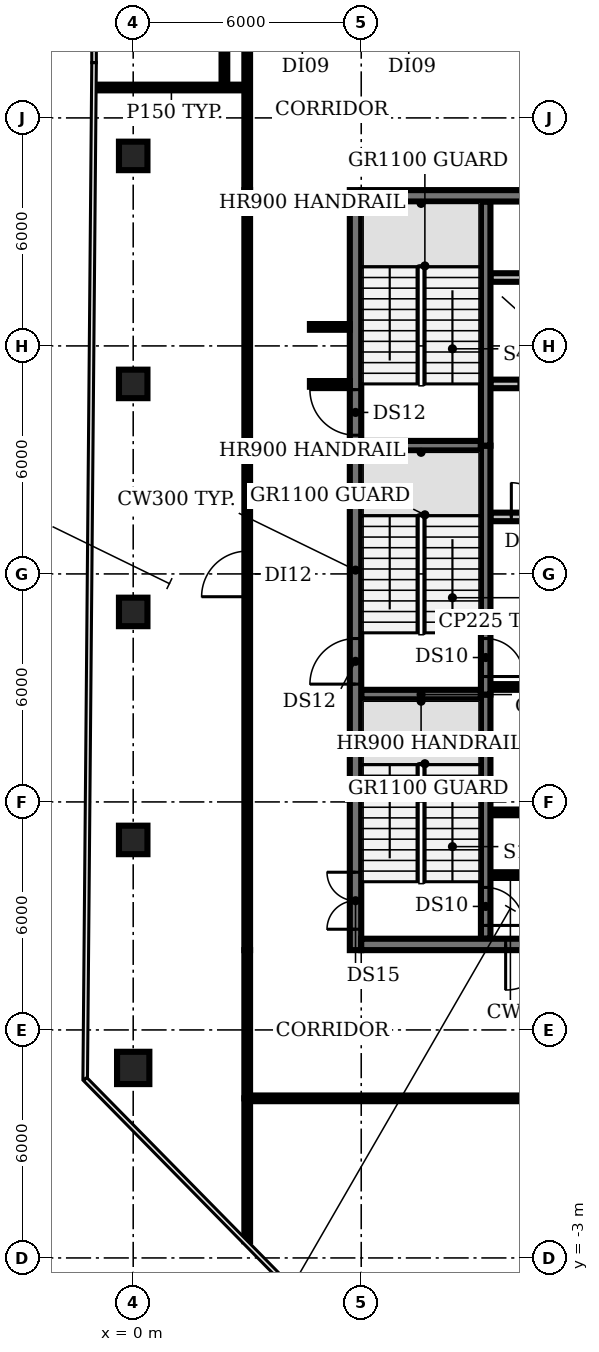
"""IFC4 building model, lengths in metres.
Left out: names, types, materials, properties, quantities, classifications, styles, units other than length and angle.
Written with IfcOpenShell. Run it as: python <this file> out.ifc"""

import sys

from ifc_helpers import new_model, si_unit, direction, frame, frame_2d, origin, origin_2d, place, context, subcontext, project, spatial, rectangle, circle, extrude, element, fill, save


model = new_model("IFC4")
c1 = context("Model", 3, precision=1e-05, world=origin(), true_north=direction((0.0, 1.0)))
c2 = subcontext(c1, "Body", "Model", "MODEL_VIEW")
j1 = project(units=[si_unit("LENGTHUNIT", "METRE"), si_unit("PLANEANGLEUNIT", "RADIAN")], contexts=[c1])
p1 = place(None, origin())
s1 = spatial("IfcSite", under=j1, at=p1, CompositionType="ELEMENT")
p2 = place(p1, origin())
s2 = spatial("IfcBuilding", under=s1, at=p2, CompositionType="ELEMENT")
p3 = place(p2, frame((0.0, 0.0, 285.2)))
s3 = spatial("IfcBuildingStorey", under=s2, at=p3, CompositionType="ELEMENT", Elevation=285.2)
p4 = place(p3, frame((0.0, 2.0, 0.0), z_axis=(0.0, 0.0, 1.0), x_axis=(1.0, 0.0, 0.0)))
e1 = element("IfcColumn", 1, at=p4, inside=s3, PredefinedType="COLUMN", context=c2, shape_type="SweptSolid", body=[
    extrude(circle(Radius=0.425, at=origin_2d()), origin(), (0.0, 0.0, 1.0), 3.85),
])
for number, where, z_axis, x_axis in (
    (2, (0.0, 8.0, 0.0), (0.0, 0.0, 1.0), (1.0, 0.0, 0.0)),
    (3, (0.0, 14.0, 0.0), (0.0, 0.0, 1.0), (1.0, 0.0, 0.0)),
    (4, (0.0, 20.0, 0.0), (0.0, 0.0, 1.0), (1.0, 0.0, 0.0)),
    (5, (0.0, 26.0, 0.0), (0.0, 0.0, 1.0), (1.0, 0.0, 0.0)),
):
    element("IfcColumn", number, at=place(p3, frame(where, z_axis=z_axis, x_axis=x_axis)), inside=s3, PredefinedType="COLUMN", context=c2, shape_type="SweptSolid", body=[
        extrude(rectangle(XDim=0.75, YDim=0.75, at=origin_2d()), origin(), (0.0, 0.0, 1.0), 3.85),
    ])
for number, where, z_axis, x_axis in (
    (6, (9.4, 7.075, 0.0), (0.0, 0.0, 1.0), (1.0, 0.0, 0.0)),
    (7, (9.4, 8.725, 0.0), (0.0, 0.0, 1.0), (1.0, 0.0, 0.0)),
    (8, (9.4, 10.375, 0.0), (0.0, 0.0, 1.0), (1.0, 0.0, 0.0)),
):
    element("IfcWall", number, at=place(p3, frame(where, z_axis=z_axis, x_axis=x_axis)), inside=s3, PredefinedType="SHEAR", context=c2, shape_type="SweptSolid", body=[
        extrude(rectangle(XDim=1.05, YDim=0.15, at=frame_2d((0.525, 0.0))), origin(), (0.0, 0.0, 1.0), 3.85),
    ])
p5 = place(p3, frame((6.0, 11.825, 0.0), z_axis=(0.0, 0.0, 1.0), x_axis=(1.0, 0.0, 0.0)))
e9 = element("IfcWall", 9, at=p5, inside=s3, PredefinedType="SHEAR", context=c2, shape_type="SweptSolid", body=[
    extrude(rectangle(XDim=3.15, YDim=0.25, at=frame_2d((1.575, 0.0))), origin(), (0.0, 0.0, 1.0), 3.85),
])
p6 = place(p3, frame((9.4, 12.025, 0.0), z_axis=(0.0, 0.0, 1.0), x_axis=(1.0, 0.0, 0.0)))
e10 = element("IfcWall", 10, at=p6, inside=s3, PredefinedType="SHEAR", context=c2, shape_type="SweptSolid", body=[
    extrude(rectangle(XDim=1.05, YDim=0.15, at=frame_2d((0.525, 0.0))), origin(), (0.0, 0.0, 1.0), 3.85),
])
p7 = place(p3, frame((9.4, 13.7, 0.0), z_axis=(0.0, 0.0, 1.0), x_axis=(1.0, 0.0, 0.0)))
e11 = element("IfcWall", 11, at=p7, inside=s3, PredefinedType="PARTITIONING", context=c2, shape_type="SweptSolid", body=[
    extrude(rectangle(XDim=4.0, YDim=0.225, at=frame_2d((2.0, 0.0))), origin(), (0.0, 0.0, 1.0), 3.85),
])
p8 = place(p3, frame((9.4, 16.5, 0.0), z_axis=(0.0, 0.0, 1.0), x_axis=(1.0, 0.0, 0.0)))
e12 = element("IfcWall", 12, at=p8, inside=s3, PredefinedType="PARTITIONING", context=c2, shape_type="SweptSolid", body=[
    extrude(rectangle(XDim=14.6, YDim=0.225, at=frame_2d((7.3, 0.0))), origin(), (0.0, 0.0, 1.0), 3.85),
])
p9 = place(p8, frame((0.55, 0.0, 0.0)))
e13 = element("IfcOpeningElement", 13, at=p9, cuts=e12, PredefinedType="OPENING", context=c2, shape_type="SweptSolid", body=[
    extrude(rectangle(XDim=0.9, YDim=2.1, at=frame_2d((0.45, 1.05))), frame((0.0, 0.123, 0.0), z_axis=(0.0, -1.0, 0.0), x_axis=(1.0, 0.0, 0.0)), (0.0, 0.0, 1.0), 0.245),
])
p10 = place(p8, frame((6.075, 0.0, 0.0)))
e14 = element("IfcOpeningElement", 14, at=p10, cuts=e12, PredefinedType="OPENING", context=c2, shape_type="SweptSolid", body=[
    extrude(rectangle(XDim=1.0, YDim=2.1, at=frame_2d((0.5, 1.05))), frame((0.0, 0.123, 0.0), z_axis=(0.0, -1.0, 0.0), x_axis=(1.0, 0.0, 0.0)), (0.0, 0.0, 1.0), 0.245),
])
p11 = place(p8, frame((11.647, 0.0, 0.0)))
e15 = element("IfcOpeningElement", 15, at=p11, cuts=e12, PredefinedType="OPENING", context=c2, shape_type="SweptSolid", body=[
    extrude(rectangle(XDim=0.9, YDim=2.1, at=frame_2d((0.45, 1.05))), frame((0.0, 0.123, 0.0), z_axis=(0.0, -1.0, 0.0), x_axis=(1.0, 0.0, 0.0)), (0.0, 0.0, 1.0), 0.245),
])
p12 = place(p8, frame((13.423, 0.0, 0.0)))
e16 = element("IfcOpeningElement", 16, at=p12, cuts=e12, PredefinedType="OPENING", context=c2, shape_type="SweptSolid", body=[
    extrude(rectangle(XDim=0.9, YDim=2.1, at=frame_2d((0.45, 1.05))), frame((0.0, 0.123, 0.0), z_axis=(0.0, -1.0, 0.0), x_axis=(1.0, 0.0, 0.0)), (0.0, 0.0, 1.0), 0.245),
])
p13 = place(p3, frame((6.0, 18.375, 0.0), z_axis=(0.0, 0.0, 1.0), x_axis=(1.0, 0.0, 0.0)))
e17 = element("IfcWall", 17, at=p13, inside=s3, PredefinedType="SHEAR", context=c2, shape_type="SweptSolid", body=[
    extrude(rectangle(XDim=3.15, YDim=0.25, at=frame_2d((1.575, 0.0))), origin(), (0.0, 0.0, 1.0), 3.85),
])
p14 = place(p3, frame((24.0, 20.0, 0.0), z_axis=(0.0, 0.0, 1.0), x_axis=(-1.0, 0.0, 0.0)))
e18 = element("IfcWall", 18, at=p14, inside=s3, PredefinedType="PARTITIONING", context=c2, shape_type="SweptSolid", body=[
    extrude(rectangle(XDim=14.6, YDim=0.225, at=frame_2d((7.3, 0.0))), origin(), (0.0, 0.0, 1.0), 3.85),
])
p15 = place(p14, frame((12.75, 0.0, 0.0)))
e19 = element("IfcOpeningElement", 19, at=p15, cuts=e18, PredefinedType="OPENING", context=c2, shape_type="SweptSolid", body=[
    extrude(rectangle(XDim=1.1, YDim=2.1, at=frame_2d((0.55, 1.05))), frame((0.0, 0.123, 0.0), z_axis=(0.0, -1.0, 0.0), x_axis=(1.0, 0.0, 0.0)), (0.0, 0.0, 1.0), 0.245),
])
p16 = place(p14, frame((9.95, 0.0, 0.0)))
e20 = element("IfcOpeningElement", 20, at=p16, cuts=e18, PredefinedType="OPENING", context=c2, shape_type="SweptSolid", body=[
    extrude(rectangle(XDim=1.1, YDim=2.1, at=frame_2d((0.55, 1.05))), frame((0.0, 0.123, 0.0), z_axis=(0.0, -1.0, 0.0), x_axis=(1.0, 0.0, 0.0)), (0.0, 0.0, 1.0), 0.245),
])
p17 = place(p14, frame((7.15, 0.0, 0.0)))
e21 = element("IfcOpeningElement", 21, at=p17, cuts=e18, PredefinedType="OPENING", context=c2, shape_type="SweptSolid", body=[
    extrude(rectangle(XDim=1.1, YDim=2.1, at=frame_2d((0.55, 1.05))), frame((0.0, 0.123, 0.0), z_axis=(0.0, -1.0, 0.0), x_axis=(1.0, 0.0, 0.0)), (0.0, 0.0, 1.0), 0.245),
])
p18 = place(p14, frame((4.35, 0.0, 0.0)))
e22 = element("IfcOpeningElement", 22, at=p18, cuts=e18, PredefinedType="OPENING", context=c2, shape_type="SweptSolid", body=[
    extrude(rectangle(XDim=1.1, YDim=2.1, at=frame_2d((0.55, 1.05))), frame((0.0, 0.123, 0.0), z_axis=(0.0, -1.0, 0.0), x_axis=(1.0, 0.0, 0.0)), (0.0, 0.0, 1.0), 0.245),
])
p19 = place(p14, frame((2.137, 0.0, 0.0)))
e23 = element("IfcOpeningElement", 23, at=p19, cuts=e18, PredefinedType="OPENING", context=c2, shape_type="SweptSolid", body=[
    extrude(rectangle(XDim=0.9, YDim=2.1, at=frame_2d((0.45, 1.05))), frame((0.0, 0.123, 0.0), z_axis=(0.0, -1.0, 0.0), x_axis=(1.0, 0.0, 0.0)), (0.0, 0.0, 1.0), 0.245),
])
p20 = place(p14, frame((0.612, 0.0, 0.0)))
e24 = element("IfcOpeningElement", 24, at=p20, cuts=e18, PredefinedType="OPENING", context=c2, shape_type="SweptSolid", body=[
    extrude(rectangle(XDim=0.9, YDim=2.1, at=frame_2d((0.45, 1.05))), frame((0.0, 0.123, 0.0), z_axis=(0.0, -1.0, 0.0), x_axis=(1.0, 0.0, 0.0)), (0.0, 0.0, 1.0), 0.245),
])
p21 = place(p3, frame((9.4, 22.8, 0.0), z_axis=(0.0, 0.0, 1.0), x_axis=(1.0, 0.0, 0.0)))
e25 = element("IfcWall", 25, at=p21, inside=s3, PredefinedType="PARTITIONING", context=c2, shape_type="SweptSolid", body=[
    extrude(rectangle(XDim=14.6, YDim=0.225, at=frame_2d((7.3, 0.0))), origin(), (0.0, 0.0, 1.0), 3.85),
])
p22 = place(p3, frame((9.275, 11.825, 0.0), z_axis=(0.0, 0.0, 1.0), x_axis=(0.0, -1.0, 0.0)))
e26 = element("IfcWall", 26, at=p22, inside=s3, PredefinedType="SHEAR", context=c2, shape_type="SweptSolid", body=[
    extrude(rectangle(XDim=6.425, YDim=0.25, at=frame_2d((3.212, 0.0))), origin(), (0.0, 0.0, 1.0), 3.85),
])
p23 = place(p22, frame((5.075, 0.0, 0.0)))
e27 = element("IfcOpeningElement", 27, at=p23, cuts=e26, PredefinedType="OPENING", context=c2, shape_type="SweptSolid", body=[
    extrude(rectangle(XDim=1.0, YDim=2.1, at=frame_2d((0.5, 1.05))), frame((0.0, 0.135, 0.0), z_axis=(0.0, -1.0, 0.0), x_axis=(1.0, 0.0, 0.0)), (0.0, 0.0, 1.0), 0.27),
])
p24 = place(p3, frame((9.275, 18.375, 0.0), z_axis=(0.0, 0.0, 1.0), x_axis=(0.0, -1.0, 0.0)))
e28 = element("IfcWall", 28, at=p24, inside=s3, PredefinedType="SHEAR", context=c2, shape_type="SweptSolid", body=[
    extrude(rectangle(XDim=6.55, YDim=0.25, at=frame_2d((3.275, 0.0))), origin(), (0.0, 0.0, 1.0), 3.85),
])
p25 = place(p24, frame((5.075, 0.0, 0.0)))
e29 = element("IfcOpeningElement", 29, at=p25, cuts=e28, PredefinedType="OPENING", context=c2, shape_type="SweptSolid", body=[
    extrude(rectangle(XDim=1.0, YDim=2.1, at=frame_2d((0.5, 1.05))), frame((0.0, 0.135, 0.0), z_axis=(0.0, -1.0, 0.0), x_axis=(1.0, 0.0, 0.0)), (0.0, 0.0, 1.0), 0.27),
])
p26 = place(p3, frame((9.275, 18.375, 0.0), z_axis=(0.0, 0.0, 1.0), x_axis=(0.0, 1.0, 0.0)))
e30 = element("IfcWall", 30, at=p26, inside=s3, PredefinedType="SHEAR", context=c2, shape_type="SweptSolid", body=[
    extrude(rectangle(XDim=6.425, YDim=0.25, at=frame_2d((3.212, 0.0))), origin(), (0.0, 0.0, 1.0), 3.85),
])
p27 = place(p3, frame((5.85, 5.1, 0.0), z_axis=(0.0, 0.0, 1.0), x_axis=(0.0, 1.0, 0.0)))
e31 = element("IfcWall", 31, at=p27, inside=s3, PredefinedType="SHEAR", context=c2, shape_type="SweptSolid", body=[
    extrude(rectangle(XDim=20.0, YDim=0.3, at=frame_2d((10.0, 0.0))), origin(), (0.0, 0.0, 1.0), 3.85),
])
p28 = place(p27, frame((0.55, 0.0, 0.0)))
e32 = element("IfcOpeningElement", 32, at=p28, cuts=e31, PredefinedType="OPENING", context=c2, shape_type="SweptSolid", body=[
    extrude(rectangle(XDim=1.5, YDim=2.1, at=frame_2d((0.75, 1.05))), frame((0.0, 0.16, 0.0), z_axis=(0.0, -1.0, 0.0), x_axis=(1.0, 0.0, 0.0)), (0.0, 0.0, 1.0), 0.32),
])
p29 = place(p27, frame((7.0, 0.0, 0.0)))
e33 = element("IfcOpeningElement", 33, at=p29, cuts=e31, PredefinedType="OPENING", context=c2, shape_type="SweptSolid", body=[
    extrude(rectangle(XDim=1.2, YDim=2.1, at=frame_2d((0.6, 1.05))), frame((0.0, 0.16, 0.0), z_axis=(0.0, -1.0, 0.0), x_axis=(1.0, 0.0, 0.0)), (0.0, 0.0, 1.0), 0.32),
])
p30 = place(p27, frame((13.55, 0.0, 0.0)))
e34 = element("IfcOpeningElement", 34, at=p30, cuts=e31, PredefinedType="OPENING", context=c2, shape_type="SweptSolid", body=[
    extrude(rectangle(XDim=1.2, YDim=2.1, at=frame_2d((0.6, 1.05))), frame((0.0, 0.16, 0.0), z_axis=(0.0, -1.0, 0.0), x_axis=(1.0, 0.0, 0.0)), (0.0, 0.0, 1.0), 0.32),
])
p31 = place(p3, frame((24.0, 5.25, 0.0), z_axis=(0.0, 0.0, 1.0), x_axis=(-1.0, 0.0, 0.0)))
e35 = element("IfcWall", 35, at=p31, inside=s3, PredefinedType="SHEAR", context=c2, shape_type="SweptSolid", body=[
    extrude(rectangle(XDim=18.0, YDim=0.3, at=frame_2d((9.0, 0.0))), origin(), (0.0, 0.0, 1.0), 3.85),
])
p32 = place(p31, frame((13.0, 0.0, 0.0)))
e36 = element("IfcOpeningElement", 36, at=p32, cuts=e35, PredefinedType="OPENING", context=c2, shape_type="SweptSolid", body=[
    extrude(rectangle(XDim=1.2, YDim=2.1, at=frame_2d((0.6, 1.05))), frame((0.0, 0.16, 0.0), z_axis=(0.0, -1.0, 0.0), x_axis=(1.0, 0.0, 0.0)), (0.0, 0.0, 1.0), 0.32),
])
p33 = place(p31, frame((4.9, 0.0, 0.0)))
e37 = element("IfcOpeningElement", 37, at=p33, cuts=e35, PredefinedType="OPENING", context=c2, shape_type="SweptSolid", body=[
    extrude(rectangle(XDim=1.0, YDim=2.1, at=frame_2d((0.5, 1.05))), frame((0.0, 0.16, 0.0), z_axis=(0.0, -1.0, 0.0), x_axis=(1.0, 0.0, 0.0)), (0.0, 0.0, 1.0), 0.32),
])
p34 = place(p3, frame((6.0, 24.95, 0.0), z_axis=(0.0, 0.0, 1.0), x_axis=(1.0, 0.0, 0.0)))
e38 = element("IfcWall", 38, at=p34, inside=s3, PredefinedType="SHEAR", context=c2, shape_type="SweptSolid", body=[
    extrude(rectangle(XDim=18.0, YDim=0.3, at=frame_2d((9.0, 0.0))), origin(), (0.0, 0.0, 1.0), 3.85),
])
p35 = place(p3, frame((-0.99, 27.8, 0.0), z_axis=(0.0, 0.0, 1.0), x_axis=(1.0, 0.0, 0.0)))
e39 = element("IfcWall", 39, at=p35, inside=s3, PredefinedType="PARTITIONING", context=c2, shape_type="SweptSolid", body=[
    extrude(rectangle(XDim=3.99, YDim=0.15, at=frame_2d((1.995, 0.0))), origin(), (0.0, 0.0, 1.0), 2.9),
])
p36 = place(p3, frame((2.4, 27.8, 0.0), z_axis=(0.0, 0.0, 1.0), x_axis=(0.0, 1.0, 0.0)))
e40 = element("IfcWall", 40, at=p36, inside=s3, PredefinedType="PARTITIONING", context=c2, shape_type="SweptSolid", body=[
    extrude(rectangle(XDim=6.0, YDim=0.15, at=frame_2d((3.0, 0.0))), origin(), (0.0, 0.0, 1.0), 2.9),
])
p37 = place(p3, frame((3.0, -2.56, 0.0), z_axis=(0.0, 0.0, 1.0), x_axis=(0.0, 1.0, 0.0)))
e41 = element("IfcWall", 41, at=p37, inside=s3, PredefinedType="PARTITIONING", context=c2, shape_type="SweptSolid", body=[
    extrude(rectangle(XDim=3.76, YDim=0.15, at=frame_2d((1.88, 0.0))), origin(), (0.0, 0.0, 1.0), 2.9),
])
p38 = place(p3, frame((3.0, 1.2, 0.0), z_axis=(0.0, 0.0, 1.0), x_axis=(0.0, 1.0, 0.0)))
e42 = element("IfcWall", 42, at=p38, inside=s3, PredefinedType="PARTITIONING", context=c2, shape_type="SweptSolid", body=[
    extrude(rectangle(XDim=3.9, YDim=0.15, at=frame_2d((1.95, 0.0))), origin(), (0.0, 0.0, 1.0), 2.9),
])
p39 = place(p3, frame((3.0, 5.1, 0.0), z_axis=(0.0, 0.0, 1.0), x_axis=(0.0, 1.0, 0.0)))
e43 = element("IfcWall", 43, at=p39, inside=s3, PredefinedType="PARTITIONING", context=c2, shape_type="SweptSolid", body=[
    extrude(rectangle(XDim=20.0, YDim=0.15, at=frame_2d((10.0, 0.0))), origin(), (0.0, 0.0, 1.0), 2.9),
])
p40 = place(p39, frame((9.3, 0.0, 0.0)))
e44 = element("IfcOpeningElement", 44, at=p40, cuts=e43, PredefinedType="OPENING", context=c2, shape_type="SweptSolid", body=[
    extrude(rectangle(XDim=1.2, YDim=2.1, at=frame_2d((0.6, 1.05))), frame((0.0, 0.085, 0.0), z_axis=(0.0, -1.0, 0.0), x_axis=(1.0, 0.0, 0.0)), (0.0, 0.0, 1.0), 0.17),
])
p41 = place(p3, frame((3.0, 25.1, 0.0), z_axis=(0.0, 0.0, 1.0), x_axis=(0.0, 1.0, 0.0)))
e45 = element("IfcWall", 45, at=p41, inside=s3, PredefinedType="PARTITIONING", context=c2, shape_type="SweptSolid", body=[
    extrude(rectangle(XDim=3.9, YDim=0.15, at=frame_2d((1.95, 0.0))), origin(), (0.0, 0.0, 1.0), 2.9),
])
for number, where, z_axis, x_axis in (
    (46, (4.65, 20.0, 0.0), (0.0, 0.0, 1.0), (1.0, 0.0, 0.0)),
    (47, (4.65, 21.5, 0.0), (0.0, 0.0, 1.0), (1.0, 0.0, 0.0)),
):
    element("IfcWall", number, at=place(p3, frame(where, z_axis=z_axis, x_axis=x_axis)), inside=s3, PredefinedType="PARTITIONING", context=c2, shape_type="SweptSolid", body=[
        extrude(rectangle(XDim=1.05, YDim=0.15, at=frame_2d((0.525, 0.0))), origin(), (0.0, 0.0, 1.0), 2.9),
    ])
p42 = place(p3, frame((27.0, 1.2, 0.0), z_axis=(0.0, 0.0, 1.0), x_axis=(-1.0, 0.0, 0.0)))
e48 = element("IfcWall", 48, at=p42, inside=s3, PredefinedType="PARTITIONING", context=c2, shape_type="SweptSolid", body=[
    extrude(rectangle(XDim=24.0, YDim=0.15, at=frame_2d((12.0, 0.0))), origin(), (0.0, 0.0, 1.0), 2.9),
])
p43 = place(p42, frame((11.5, 0.0, 0.0)))
e49 = element("IfcOpeningElement", 49, at=p43, cuts=e48, PredefinedType="OPENING", context=c2, shape_type="SweptSolid", body=[
    extrude(rectangle(XDim=1.2, YDim=2.1, at=frame_2d((0.6, 1.05))), frame((0.0, 0.085, 0.0), z_axis=(0.0, -1.0, 0.0), x_axis=(1.0, 0.0, 0.0)), (0.0, 0.0, 1.0), 0.17),
])
p44 = place(p9, origin())
e50 = element("IfcDoor", 50, at=p44, inside=s3, OperationType="SINGLE_SWING_LEFT", PredefinedType="DOOR", context=c2, shape_type="SweptSolid", body=[
    extrude(rectangle(XDim=0.9, YDim=2.1, at=frame_2d((0.45, 1.05))), frame((0.0, 0.025, 0.0), z_axis=(0.0, -1.0, 0.0), x_axis=(1.0, 0.0, 0.0)), (0.0, 0.0, 1.0), 0.05),
])
fill(e13, e50)
p45 = place(p23, origin())
e51 = element("IfcDoor", 51, at=p45, inside=s3, OperationType="SINGLE_SWING_RIGHT", PredefinedType="DOOR", context=c2, shape_type="SweptSolid", body=[
    extrude(rectangle(XDim=1.0, YDim=2.1, at=frame_2d((0.5, 1.05))), frame((0.0, 0.025, 0.0), z_axis=(0.0, -1.0, 0.0), x_axis=(1.0, 0.0, 0.0)), (0.0, 0.0, 1.0), 0.05),
])
fill(e27, e51)
p46 = place(p25, origin())
e52 = element("IfcDoor", 52, at=p46, inside=s3, OperationType="SINGLE_SWING_RIGHT", PredefinedType="DOOR", context=c2, shape_type="SweptSolid", body=[
    extrude(rectangle(XDim=1.0, YDim=2.1, at=frame_2d((0.5, 1.05))), frame((0.0, 0.025, 0.0), z_axis=(0.0, -1.0, 0.0), x_axis=(1.0, 0.0, 0.0)), (0.0, 0.0, 1.0), 0.05),
])
fill(e29, e52)
p47 = place(p28, origin())
e53 = element("IfcDoor", 53, at=p47, inside=s3, OperationType="DOUBLE_DOOR_SINGLE_SWING", PredefinedType="DOOR", context=c2, shape_type="SweptSolid", body=[
    extrude(rectangle(XDim=1.5, YDim=2.1, at=frame_2d((0.75, 1.05))), frame((0.0, 0.025, 0.0), z_axis=(0.0, -1.0, 0.0), x_axis=(1.0, 0.0, 0.0)), (0.0, 0.0, 1.0), 0.05),
])
fill(e32, e53)
p48 = place(p29, origin())
e54 = element("IfcDoor", 54, at=p48, inside=s3, OperationType="SINGLE_SWING_LEFT", PredefinedType="DOOR", context=c2, shape_type="SweptSolid", body=[
    extrude(rectangle(XDim=1.2, YDim=2.1, at=frame_2d((0.6, 1.05))), frame((0.0, 0.025, 0.0), z_axis=(0.0, -1.0, 0.0), x_axis=(1.0, 0.0, 0.0)), (0.0, 0.0, 1.0), 0.05),
])
fill(e33, e54)
p49 = place(p30, origin())
e55 = element("IfcDoor", 55, at=p49, inside=s3, OperationType="SINGLE_SWING_RIGHT", PredefinedType="DOOR", context=c2, shape_type="SweptSolid", body=[
    extrude(rectangle(XDim=1.2, YDim=2.1, at=frame_2d((0.6, 1.05))), frame((0.0, 0.025, 0.0), z_axis=(0.0, -1.0, 0.0), x_axis=(1.0, 0.0, 0.0)), (0.0, 0.0, 1.0), 0.05),
])
fill(e34, e55)
p50 = place(p32, origin())
e56 = element("IfcDoor", 56, at=p50, inside=s3, OperationType="SINGLE_SWING_RIGHT", PredefinedType="DOOR", context=c2, shape_type="SweptSolid", body=[
    extrude(rectangle(XDim=1.2, YDim=2.1, at=frame_2d((0.6, 1.05))), frame((0.0, 0.025, 0.0), z_axis=(0.0, -1.0, 0.0), x_axis=(1.0, 0.0, 0.0)), (0.0, 0.0, 1.0), 0.05),
])
fill(e36, e56)
p51 = place(p40, origin())
e57 = element("IfcDoor", 57, at=p51, inside=s3, OperationType="SINGLE_SWING_LEFT", PredefinedType="DOOR", context=c2, shape_type="SweptSolid", body=[
    extrude(rectangle(XDim=1.2, YDim=2.1, at=frame_2d((0.6, 1.05))), frame((0.0, 0.025, 0.0), z_axis=(0.0, -1.0, 0.0), x_axis=(1.0, 0.0, 0.0)), (0.0, 0.0, 1.0), 0.05),
])
fill(e44, e57)
save(model, sys.argv[1])
